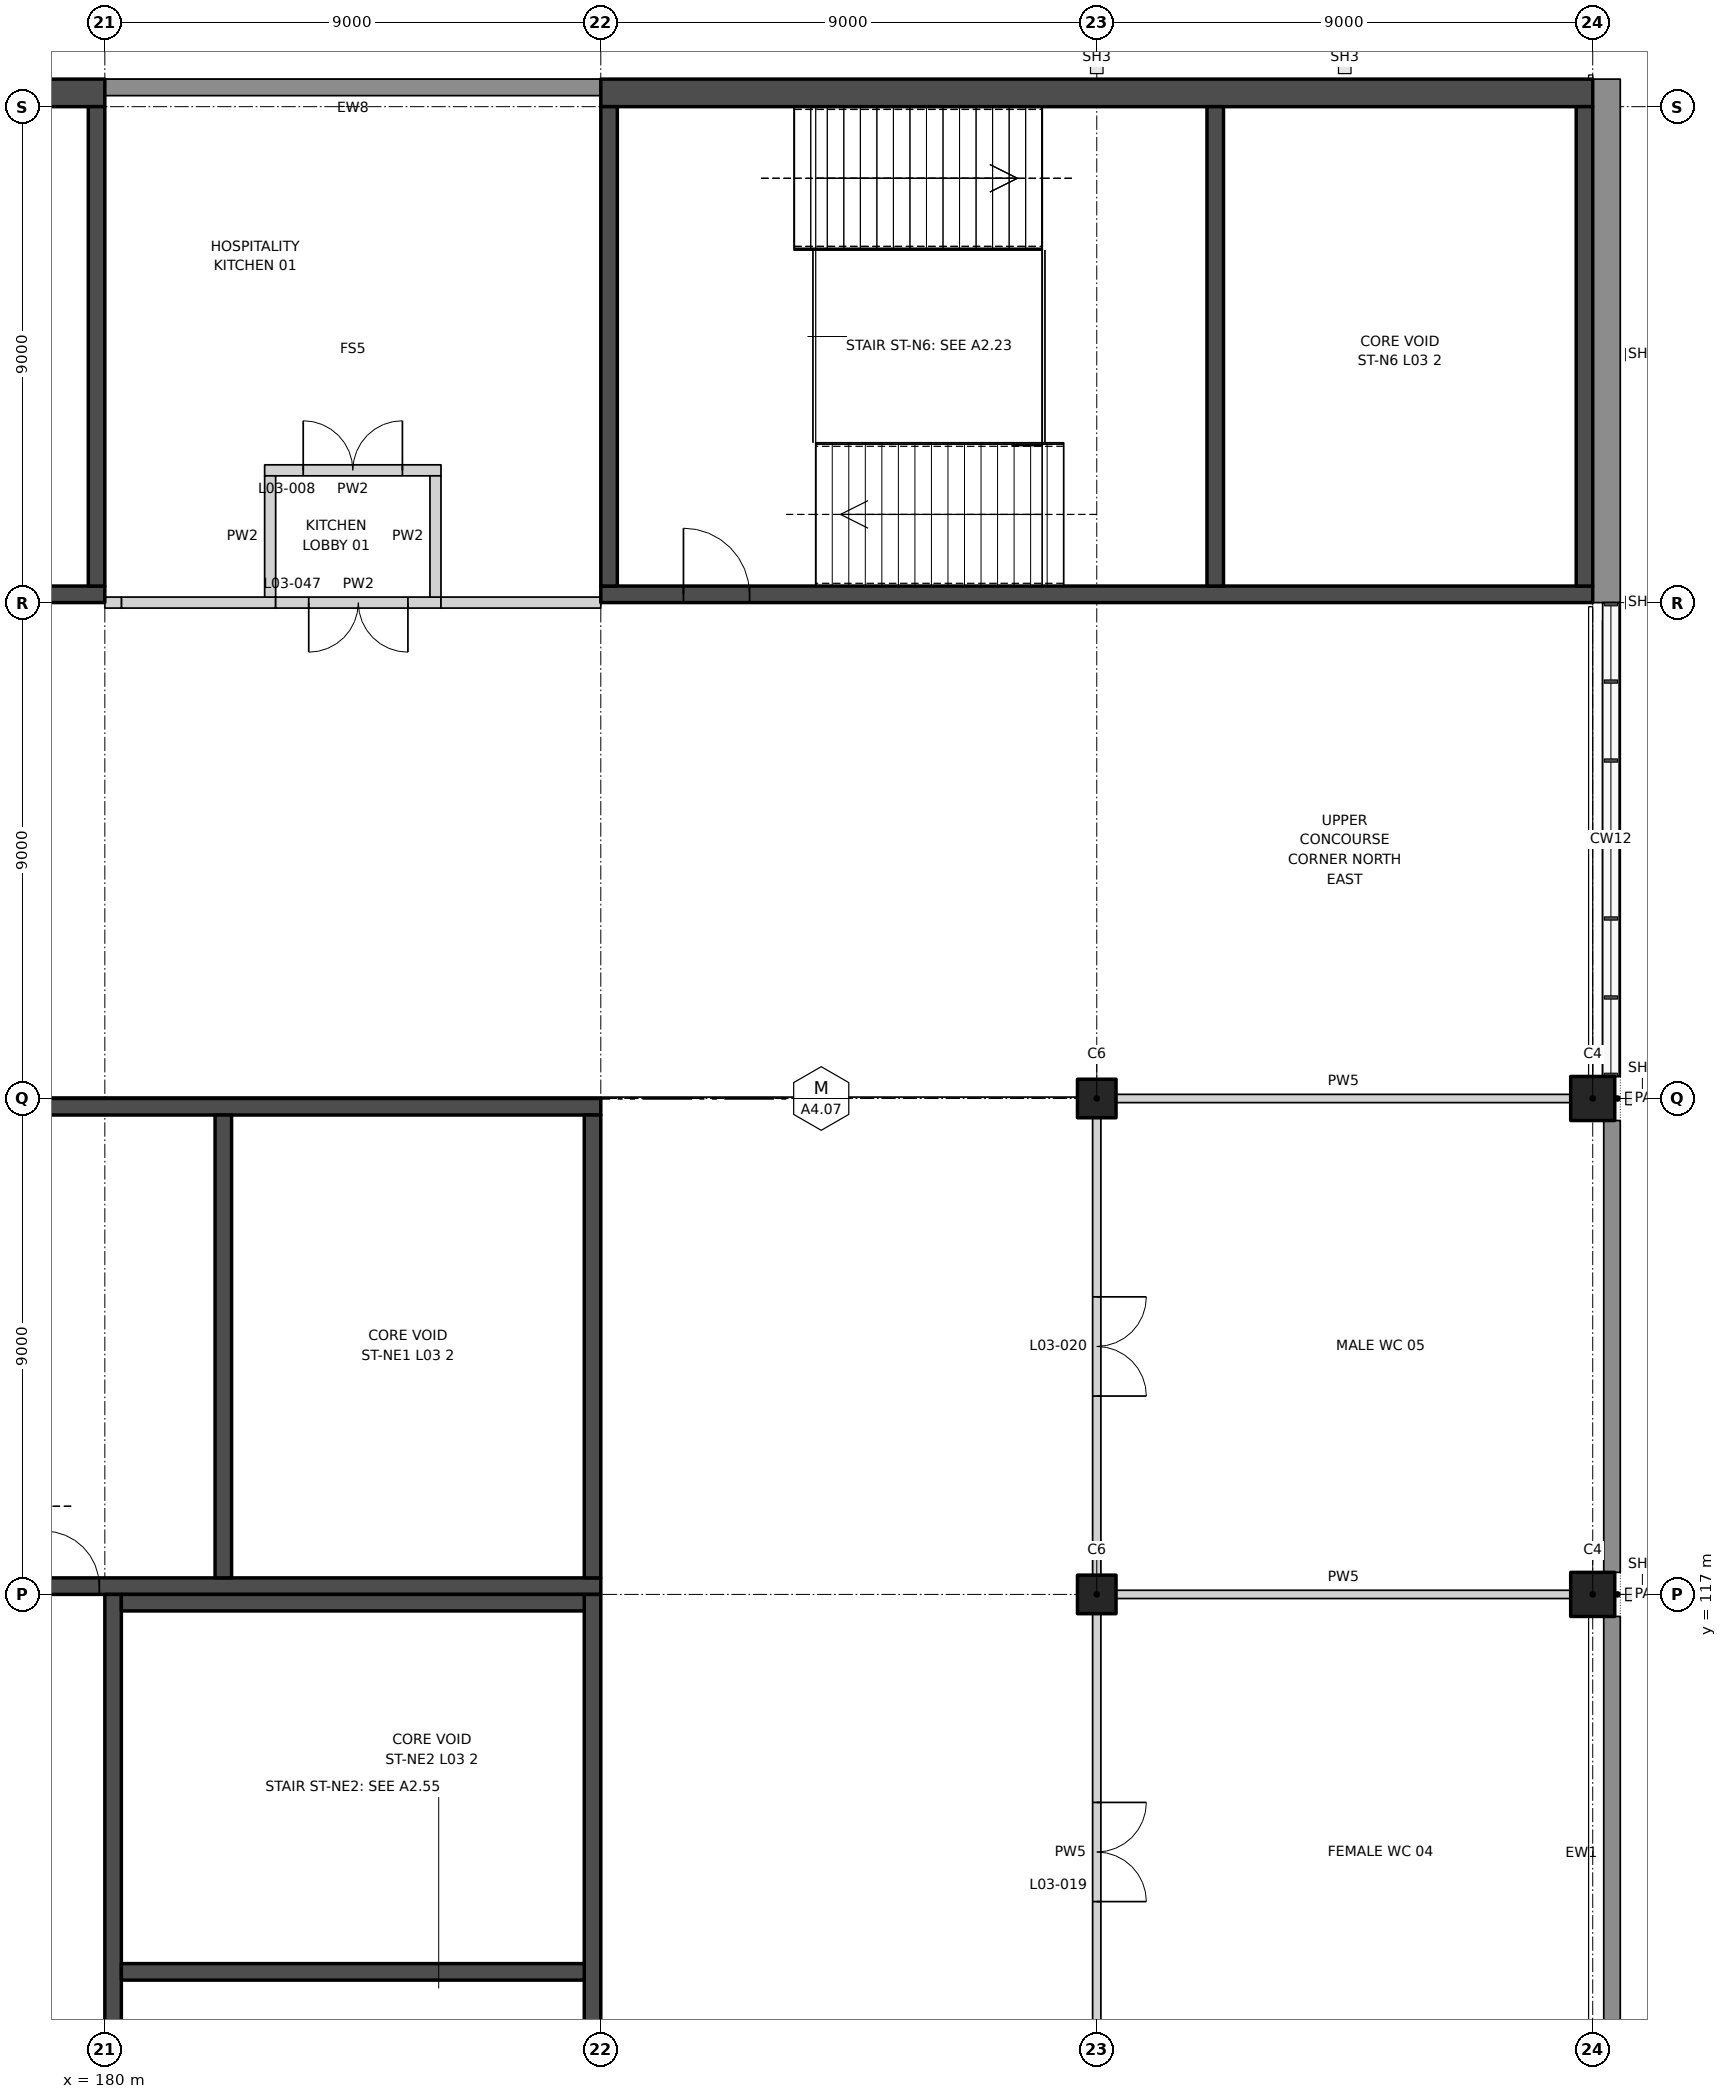
"""IFC4 building model, lengths in metres.
Left out: names, types, materials, properties, quantities, classifications, styles, units other than length and angle.
Written with IfcOpenShell. Run it as: python <this file> out.ifc"""

import sys

from ifc_helpers import new_model, si_unit, direction, frame, frame_2d, origin, origin_2d, place, context, subcontext, project, spatial, rectangle, extrude, element, fill, save


model = new_model("IFC4")
c1 = context("Model", 3, precision=1e-05, world=origin(), true_north=direction((0.0, 1.0)))
c2 = subcontext(c1, "Body", "Model", "MODEL_VIEW")
j1 = project(units=[si_unit("LENGTHUNIT", "METRE"), si_unit("PLANEANGLEUNIT", "RADIAN")], contexts=[c1])
p1 = place(None, origin())
s1 = spatial("IfcSite", under=j1, at=p1, CompositionType="ELEMENT")
p2 = place(p1, origin())
s2 = spatial("IfcBuilding", under=s1, at=p2, CompositionType="ELEMENT")
p3 = place(p2, frame((0.0, 0.0, 22.0)))
s3 = spatial("IfcBuildingStorey", under=s2, at=p3, CompositionType="ELEMENT", Elevation=22.0)
for number, where, z_axis, x_axis in (
    (1, (207.0, 117.0, 0.0), (0.0, 0.0, 1.0), (1.0, 0.0, 0.0)),
    (2, (207.0, 126.0, 0.0), (0.0, 0.0, 1.0), (1.0, 0.0, 0.0)),
):
    element("IfcColumn", number, at=place(p3, frame(where, z_axis=z_axis, x_axis=x_axis)), inside=s3, PredefinedType="COLUMN", context=c2, shape_type="SweptSolid", body=[
        extrude(rectangle(XDim=0.8, YDim=0.8, at=origin_2d()), origin(), (0.0, 0.0, 1.0), 6.0),
    ])
for number, where, z_axis, x_axis in (
    (3, (198.0, 117.0, 0.0), (0.0, 0.0, 1.0), (1.0, 0.0, 0.0)),
    (4, (198.0, 126.0, 0.0), (0.0, 0.0, 1.0), (1.0, 0.0, 0.0)),
):
    element("IfcColumn", number, at=place(p3, frame(where, z_axis=z_axis, x_axis=x_axis)), inside=s3, PredefinedType="COLUMN", context=c2, shape_type="SweptSolid", body=[
        extrude(rectangle(XDim=0.7, YDim=0.7, at=origin_2d()), origin(), (0.0, 0.0, 1.0), 6.0),
    ])
for number, where, z_axis, x_axis in (
    (5, (198.35, 117.0, 0.0), (0.0, 0.0, 1.0), (1.0, 0.0, 0.0)),
    (6, (198.35, 126.0, 0.0), (0.0, 0.0, 1.0), (1.0, 0.0, 0.0)),
):
    element("IfcWall", number, at=place(p3, frame(where, z_axis=z_axis, x_axis=x_axis)), inside=s3, PredefinedType="PARTITIONING", context=c2, shape_type="SweptSolid", body=[
        extrude(rectangle(XDim=8.25, YDim=0.15, at=frame_2d((4.125, 0.0))), origin(), (0.0, 0.0, 1.0), 4.8),
    ])
p4 = place(p3, frame((180.3, 135.0, 0.0), z_axis=(0.0, 0.0, 1.0), x_axis=(1.0, 0.0, 0.0)))
e7 = element("IfcWall", 7, at=p4, inside=s3, PredefinedType="PARTITIONING", context=c2, shape_type="SweptSolid", body=[
    extrude(rectangle(XDim=2.8, YDim=0.2, at=frame_2d((1.4, 0.0))), origin(), (0.0, 0.0, 1.0), 4.7),
])
p5 = place(p3, frame((183.1, 135.0, 0.0), z_axis=(0.0, 0.0, 1.0), x_axis=(1.0, 0.0, 0.0)))
e8 = element("IfcWall", 8, at=p5, inside=s3, PredefinedType="PARTITIONING", context=c2, shape_type="SweptSolid", body=[
    extrude(rectangle(XDim=3.0, YDim=0.2, at=frame_2d((1.5, 0.0))), origin(), (0.0, 0.0, 1.0), 4.7),
])
p6 = place(p5, frame((0.6, 0.0, 0.0)))
e9 = element("IfcOpeningElement", 9, at=p6, cuts=e8, PredefinedType="OPENING", context=c2, shape_type="SweptSolid", body=[
    extrude(rectangle(XDim=1.8, YDim=2.1, at=frame_2d((0.9, 1.05))), frame((0.0, 0.11, 0.0), z_axis=(0.0, -1.0, 0.0), x_axis=(1.0, 0.0, 0.0)), (0.0, 0.0, 1.0), 0.22),
])
p7 = place(p3, frame((186.1, 135.0, 0.0), z_axis=(0.0, 0.0, 1.0), x_axis=(1.0, 0.0, 0.0)))
e10 = element("IfcWall", 10, at=p7, inside=s3, PredefinedType="PARTITIONING", context=c2, shape_type="SweptSolid", body=[
    extrude(rectangle(XDim=2.9, YDim=0.2, at=frame_2d((1.45, 0.0))), origin(), (0.0, 0.0, 1.0), 4.7),
])
p8 = place(p3, frame((182.9, 137.4, 0.0), z_axis=(0.0, 0.0, 1.0), x_axis=(1.0, 0.0, 0.0)))
e11 = element("IfcWall", 11, at=p8, inside=s3, PredefinedType="PARTITIONING", context=c2, shape_type="SweptSolid", body=[
    extrude(rectangle(XDim=3.2, YDim=0.2, at=frame_2d((1.6, 0.0))), origin(), (0.0, 0.0, 1.0), 6.0),
])
p9 = place(p8, frame((0.7, 0.0, 0.0)))
e12 = element("IfcOpeningElement", 12, at=p9, cuts=e11, PredefinedType="OPENING", context=c2, shape_type="SweptSolid", body=[
    extrude(rectangle(XDim=1.8, YDim=2.1, at=frame_2d((0.9, 1.05))), frame((0.0, 0.11, 0.0), z_axis=(0.0, -1.0, 0.0), x_axis=(1.0, 0.0, 0.0)), (0.0, 0.0, 1.0), 0.22),
])
for number, where, z_axis, x_axis in (
    (13, (183.0, 135.1, 0.0), (0.0, 0.0, 1.0), (0.0, 1.0, 0.0)),
    (14, (186.0, 135.1, 0.0), (0.0, 0.0, 1.0), (0.0, 1.0, 0.0)),
):
    element("IfcWall", number, at=place(p3, frame(where, z_axis=z_axis, x_axis=x_axis)), inside=s3, PredefinedType="PARTITIONING", context=c2, shape_type="SweptSolid", body=[
        extrude(rectangle(XDim=2.2, YDim=0.2, at=frame_2d((1.1, 0.0))), origin(), (0.0, 0.0, 1.0), 6.0),
    ])
p10 = place(p3, frame((198.0, 108.0, 0.0), z_axis=(0.0, 0.0, 1.0), x_axis=(0.0, 1.0, 0.0)))
e15 = element("IfcWall", 15, at=p10, inside=s3, PredefinedType="PARTITIONING", context=c2, shape_type="SweptSolid", body=[
    extrude(rectangle(XDim=8.65, YDim=0.15, at=frame_2d((4.325, 0.0))), origin(), (0.0, 0.0, 1.0), 4.7),
])
p11 = place(p10, frame((3.425, 0.0, 0.0)))
e16 = element("IfcOpeningElement", 16, at=p11, cuts=e15, PredefinedType="OPENING", context=c2, shape_type="SweptSolid", body=[
    extrude(rectangle(XDim=1.8, YDim=2.1, at=frame_2d((0.9, 1.05))), frame((0.0, 0.085, 0.0), z_axis=(0.0, -1.0, 0.0), x_axis=(1.0, 0.0, 0.0)), (0.0, 0.0, 1.0), 0.17),
])
p12 = place(p3, frame((198.0, 117.35, 0.0), z_axis=(0.0, 0.0, 1.0), x_axis=(0.0, 1.0, 0.0)))
e17 = element("IfcWall", 17, at=p12, inside=s3, PredefinedType="PARTITIONING", context=c2, shape_type="SweptSolid", body=[
    extrude(rectangle(XDim=8.3, YDim=0.15, at=frame_2d((4.15, 0.0))), origin(), (0.0, 0.0, 1.0), 4.8),
])
p13 = place(p12, frame((3.25, 0.0, 0.0)))
e18 = element("IfcOpeningElement", 18, at=p13, cuts=e17, PredefinedType="OPENING", context=c2, shape_type="SweptSolid", body=[
    extrude(rectangle(XDim=1.8, YDim=2.1, at=frame_2d((0.9, 1.05))), frame((0.0, 0.085, 0.0), z_axis=(0.0, -1.0, 0.0), x_axis=(1.0, 0.0, 0.0)), (0.0, 0.0, 1.0), 0.17),
])
p14 = place(p3, frame((207.35, 108.0, 0.0), z_axis=(0.0, 0.0, 1.0), x_axis=(0.0, 1.0, 0.0)))
e19 = element("IfcWall", 19, at=p14, inside=s3, PredefinedType="SOLIDWALL", context=c2, shape_type="SweptSolid", body=[
    extrude(rectangle(XDim=8.6, YDim=0.3, at=frame_2d((4.3, 0.0))), origin(), (0.0, 0.0, 1.0), 6.0),
])
p15 = place(p3, frame((207.35, 117.4, 0.0), z_axis=(0.0, 0.0, 1.0), x_axis=(0.0, 1.0, 0.0)))
e20 = element("IfcWall", 20, at=p15, inside=s3, PredefinedType="SOLIDWALL", context=c2, shape_type="SweptSolid", body=[
    extrude(rectangle(XDim=8.2, YDim=0.3, at=frame_2d((4.1, 0.0))), origin(), (0.0, 0.0, 1.0), 6.0),
])
p16 = place(p3, frame((207.35, 126.4, 0.0), z_axis=(0.0, 0.0, 1.0), x_axis=(0.0, 1.0, 0.0)))
e21 = element("IfcWall", 21, at=p16, inside=s3, PredefinedType="SOLIDWALL", context=c2, shape_type="SweptSolid", body=[
    extrude(rectangle(XDim=8.6, YDim=0.3, at=frame_2d((4.3, 0.0))), origin(), (0.0, 0.0, 1.0), 1.0),
])
p17 = place(p3, frame((207.25, 135.0, 0.0), z_axis=(0.0, 0.0, 1.0), x_axis=(0.0, 1.0, 0.0)))
e22 = element("IfcWall", 22, at=p17, inside=s3, PredefinedType="SOLIDWALL", context=c2, shape_type="SweptSolid", body=[
    extrude(rectangle(XDim=9.5, YDim=0.5, at=frame_2d((4.75, 0.0))), origin(), (0.0, 0.0, 1.0), 6.0),
])
p18 = place(p3, frame((189.0, 144.35, 0.0), z_axis=(0.0, 0.0, 1.0), x_axis=(-1.0, 0.0, 0.0)))
e23 = element("IfcWall", 23, at=p18, inside=s3, PredefinedType="SOLIDWALL", context=c2, shape_type="SweptSolid", body=[
    extrude(rectangle(XDim=9.0, YDim=0.3, at=frame_2d((4.5, 0.0))), origin(), (0.0, 0.0, 1.0), 6.0),
])
p19 = place(p3, frame((180.0, 135.15, 0.0), z_axis=(0.0, 0.0, 1.0), x_axis=(-1.0, 0.0, 0.0)))
e24 = element("IfcWall", 24, at=p19, inside=s3, PredefinedType="SHEAR", context=c2, shape_type="SweptSolid", body=[
    extrude(rectangle(XDim=18.0, YDim=0.3, at=frame_2d((9.0, 0.0))), origin(), (0.0, 0.0, 1.0), 6.0),
])
p20 = place(p19, frame((1.5, 0.0, 0.0)))
e25 = element("IfcOpeningElement", 25, at=p20, cuts=e24, PredefinedType="OPENING", context=c2, shape_type="SweptSolid", body=[
    extrude(rectangle(XDim=1.2, YDim=2.1, at=frame_2d((0.6, 1.05))), frame((0.0, 0.16, 0.0), z_axis=(0.0, -1.0, 0.0), x_axis=(1.0, 0.0, 0.0)), (0.0, 0.0, 1.0), 0.32),
])
p21 = place(p3, frame((180.0, 144.25, 0.0), z_axis=(0.0, 0.0, 1.0), x_axis=(-1.0, 0.0, 0.0)))
e26 = element("IfcWall", 26, at=p21, inside=s3, PredefinedType="SHEAR", context=c2, shape_type="SweptSolid", body=[
    extrude(rectangle(XDim=18.0, YDim=0.5, at=frame_2d((9.0, 0.0))), origin(), (0.0, 0.0, 1.0), 6.0),
])
p22 = place(p3, frame((179.85, 135.3, 0.0), z_axis=(0.0, 0.0, 1.0), x_axis=(0.0, 1.0, 0.0)))
e27 = element("IfcWall", 27, at=p22, inside=s3, PredefinedType="SHEAR", context=c2, shape_type="SweptSolid", body=[
    extrude(rectangle(XDim=8.7, YDim=0.3, at=frame_2d((4.35, 0.0))), origin(), (0.0, 0.0, 1.0), 6.0),
])
p23 = place(p3, frame((189.0, 135.15, 0.0), z_axis=(0.0, 0.0, 1.0), x_axis=(1.0, 0.0, 0.0)))
e28 = element("IfcWall", 28, at=p23, inside=s3, PredefinedType="SHEAR", context=c2, shape_type="SweptSolid", body=[
    extrude(rectangle(XDim=18.0, YDim=0.3, at=frame_2d((9.0, 0.0))), origin(), (0.0, 0.0, 1.0), 6.0),
])
p24 = place(p23, frame((1.5, 0.0, 0.0)))
e29 = element("IfcOpeningElement", 29, at=p24, cuts=e28, PredefinedType="OPENING", context=c2, shape_type="SweptSolid", body=[
    extrude(rectangle(XDim=1.2, YDim=2.1, at=frame_2d((0.6, 1.05))), frame((0.0, 0.16, 0.0), z_axis=(0.0, -1.0, 0.0), x_axis=(1.0, 0.0, 0.0)), (0.0, 0.0, 1.0), 0.32),
])
p25 = place(p3, frame((189.0, 144.25, 0.0), z_axis=(0.0, 0.0, 1.0), x_axis=(1.0, 0.0, 0.0)))
e30 = element("IfcWall", 30, at=p25, inside=s3, PredefinedType="SHEAR", context=c2, shape_type="SweptSolid", body=[
    extrude(rectangle(XDim=18.0, YDim=0.5, at=frame_2d((9.0, 0.0))), origin(), (0.0, 0.0, 1.0), 6.0),
])
for number, where, z_axis, x_axis in (
    (31, (189.15, 135.3, 0.0), (0.0, 0.0, 1.0), (0.0, 1.0, 0.0)),
    (32, (206.85, 135.3, 0.0), (0.0, 0.0, 1.0), (0.0, 1.0, 0.0)),
    (33, (200.15, 135.3, 0.0), (0.0, 0.0, 1.0), (0.0, 1.0, 0.0)),
):
    element("IfcWall", number, at=place(p3, frame(where, z_axis=z_axis, x_axis=x_axis)), inside=s3, PredefinedType="SHEAR", context=c2, shape_type="SweptSolid", body=[
        extrude(rectangle(XDim=8.7, YDim=0.3, at=frame_2d((4.35, 0.0))), origin(), (0.0, 0.0, 1.0), 6.0),
    ])
p26 = place(p3, frame((170.75, 117.15, 0.0), z_axis=(0.0, 0.0, 1.0), x_axis=(1.0, 0.0, 0.0)))
e34 = element("IfcWall", 34, at=p26, inside=s3, PredefinedType="SHEAR", context=c2, shape_type="SweptSolid", body=[
    extrude(rectangle(XDim=18.25, YDim=0.3, at=frame_2d((9.125, 0.0))), origin(), (0.0, 0.0, 1.0), 6.0),
])
p27 = place(p26, frame((8.15, 0.0, 0.0)))
e35 = element("IfcOpeningElement", 35, at=p27, cuts=e34, PredefinedType="OPENING", context=c2, shape_type="SweptSolid", body=[
    extrude(rectangle(XDim=1.0, YDim=2.1, at=frame_2d((0.5, 1.05))), frame((0.0, 0.16, 0.0), z_axis=(0.0, -1.0, 0.0), x_axis=(1.0, 0.0, 0.0)), (0.0, 0.0, 1.0), 0.32),
])
p28 = place(p3, frame((171.0, 125.85, 0.0), z_axis=(0.0, 0.0, 1.0), x_axis=(1.0, 0.0, 0.0)))
e36 = element("IfcWall", 36, at=p28, inside=s3, PredefinedType="SHEAR", context=c2, shape_type="SweptSolid", body=[
    extrude(rectangle(XDim=18.0, YDim=0.3, at=frame_2d((9.0, 0.0))), origin(), (0.0, 0.0, 1.0), 6.0),
])
for number, where, z_axis, x_axis in (
    (37, (188.85, 117.3, 0.0), (0.0, 0.0, 1.0), (0.0, 1.0, 0.0)),
    (38, (182.15, 117.3, 0.0), (0.0, 0.0, 1.0), (0.0, 1.0, 0.0)),
):
    element("IfcWall", number, at=place(p3, frame(where, z_axis=z_axis, x_axis=x_axis)), inside=s3, PredefinedType="SHEAR", context=c2, shape_type="SweptSolid", body=[
        extrude(rectangle(XDim=8.4, YDim=0.3, at=frame_2d((4.2, 0.0))), origin(), (0.0, 0.0, 1.0), 6.0),
    ])
p29 = place(p3, frame((180.15, 99.0, 0.0), z_axis=(0.0, 0.0, 1.0), x_axis=(0.0, 1.0, 0.0)))
e39 = element("IfcWall", 39, at=p29, inside=s3, PredefinedType="SHEAR", context=c2, shape_type="SweptSolid", body=[
    extrude(rectangle(XDim=18.0, YDim=0.3, at=frame_2d((9.0, 0.0))), origin(), (0.0, 0.0, 1.0), 6.0),
])
p30 = place(p29, frame((8.6, 0.0, 0.0)))
e40 = element("IfcOpeningElement", 40, at=p30, cuts=e39, PredefinedType="OPENING", context=c2, shape_type="SweptSolid", body=[
    extrude(rectangle(XDim=1.2, YDim=2.1, at=frame_2d((0.6, 1.05))), frame((0.0, 0.16, 0.0), z_axis=(0.0, -1.0, 0.0), x_axis=(1.0, 0.0, 0.0)), (0.0, 0.0, 1.0), 0.32),
])
p31 = place(p3, frame((188.85, 99.0, 0.0), z_axis=(0.0, 0.0, 1.0), x_axis=(0.0, 1.0, 0.0)))
e41 = element("IfcWall", 41, at=p31, inside=s3, PredefinedType="SHEAR", context=c2, shape_type="SweptSolid", body=[
    extrude(rectangle(XDim=18.0, YDim=0.3, at=frame_2d((9.0, 0.0))), origin(), (0.0, 0.0, 1.0), 6.0),
])
for number, where, z_axis, x_axis in (
    (42, (180.3, 116.85, 0.0), (0.0, 0.0, 1.0), (1.0, 0.0, 0.0)),
    (43, (180.3, 110.15, 0.0), (0.0, 0.0, 1.0), (1.0, 0.0, 0.0)),
):
    element("IfcWall", number, at=place(p3, frame(where, z_axis=z_axis, x_axis=x_axis)), inside=s3, PredefinedType="SHEAR", context=c2, shape_type="SweptSolid", body=[
        extrude(rectangle(XDim=8.4, YDim=0.3, at=frame_2d((4.2, 0.0))), origin(), (0.0, 0.0, 1.0), 6.0),
    ])
p32 = place(p3, frame((180.0, 135.0, 0.0), z_axis=(0.0, 0.0, 1.0), x_axis=(1.0, 0.0, 0.0)))
e44 = element("IfcWall", 44, at=p32, inside=s3, PredefinedType="PARTITIONING", context=c2, shape_type="SweptSolid", body=[
    extrude(rectangle(XDim=0.3, YDim=0.2, at=frame_2d((0.15, 0.0))), origin(), (0.0, 0.0, 1.0), 6.0),
])
p33 = place(p9, origin())
e45 = element("IfcDoor", 45, at=p33, inside=s3, OperationType="DOUBLE_DOOR_DOUBLE_SWING", PredefinedType="DOOR", context=c2, shape_type="SweptSolid", body=[
    extrude(rectangle(XDim=1.8, YDim=2.1, at=frame_2d((0.9, 1.05))), frame((0.0, 0.025, 0.0), z_axis=(0.0, -1.0, 0.0), x_axis=(1.0, 0.0, 0.0)), (0.0, 0.0, 1.0), 0.05),
])
fill(e12, e45)
p34 = place(p11, frame((1.8, 0.0, 0.0), z_axis=(0.0, 0.0, 1.0), x_axis=(-1.0, 0.0, 0.0)))
e46 = element("IfcDoor", 46, at=p34, inside=s3, OperationType="DOUBLE_DOOR_DOUBLE_SWING", PredefinedType="DOOR", context=c2, shape_type="SweptSolid", body=[
    extrude(rectangle(XDim=1.8, YDim=2.1, at=frame_2d((0.9, 1.05))), frame((0.0, 0.025, 0.0), z_axis=(0.0, -1.0, 0.0), x_axis=(1.0, 0.0, 0.0)), (0.0, 0.0, 1.0), 0.05),
])
fill(e16, e46)
p35 = place(p13, frame((1.8, 0.0, 0.0), z_axis=(0.0, 0.0, 1.0), x_axis=(-1.0, 0.0, 0.0)))
e47 = element("IfcDoor", 47, at=p35, inside=s3, OperationType="DOUBLE_DOOR_DOUBLE_SWING", PredefinedType="DOOR", context=c2, shape_type="SweptSolid", body=[
    extrude(rectangle(XDim=1.8, YDim=2.1, at=frame_2d((0.9, 1.05))), frame((0.0, 0.025, 0.0), z_axis=(0.0, -1.0, 0.0), x_axis=(1.0, 0.0, 0.0)), (0.0, 0.0, 1.0), 0.05),
])
fill(e18, e47)
p36 = place(p6, frame((1.8, 0.0, 0.0), z_axis=(0.0, 0.0, 1.0), x_axis=(-1.0, 0.0, 0.0)))
e48 = element("IfcDoor", 48, at=p36, inside=s3, OperationType="DOUBLE_DOOR_DOUBLE_SWING", PredefinedType="DOOR", context=c2, shape_type="SweptSolid", body=[
    extrude(rectangle(XDim=1.8, YDim=2.1, at=frame_2d((0.9, 1.05))), frame((0.0, 0.025, 0.0), z_axis=(0.0, -1.0, 0.0), x_axis=(1.0, 0.0, 0.0)), (0.0, 0.0, 1.0), 0.05),
])
fill(e9, e48)
p37 = place(p24, origin())
e49 = element("IfcDoor", 49, at=p37, inside=s3, OperationType="SINGLE_SWING_LEFT", PredefinedType="DOOR", context=c2, shape_type="SweptSolid", body=[
    extrude(rectangle(XDim=1.2, YDim=2.1, at=frame_2d((0.6, 1.05))), frame((0.0, 0.025, 0.0), z_axis=(0.0, -1.0, 0.0), x_axis=(1.0, 0.0, 0.0)), (0.0, 0.0, 1.0), 0.05),
])
fill(e29, e49)
p38 = place(p27, origin())
e50 = element("IfcDoor", 50, at=p38, inside=s3, OperationType="SINGLE_SWING_LEFT", PredefinedType="DOOR", context=c2, shape_type="SweptSolid", body=[
    extrude(rectangle(XDim=1.0, YDim=2.1, at=frame_2d((0.5, 1.05))), frame((0.0, 0.025, 0.0), z_axis=(0.0, -1.0, 0.0), x_axis=(1.0, 0.0, 0.0)), (0.0, 0.0, 1.0), 0.05),
])
fill(e35, e50)
save(model, sys.argv[1])
